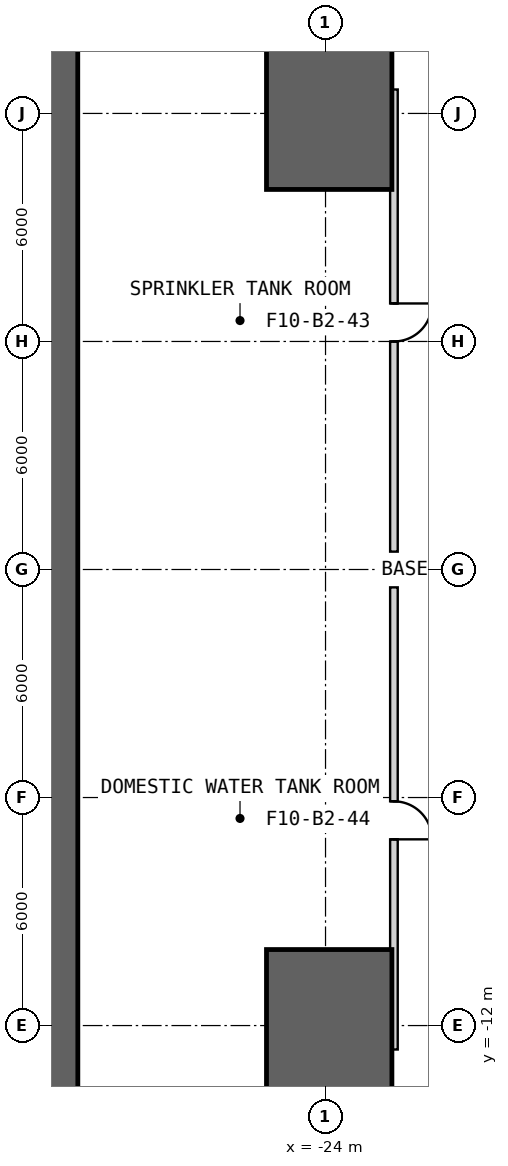
"""IFC4 building model, lengths in metres.
Left out: names, types, materials, properties, quantities, classifications, styles, units other than length and angle.
Written with IfcOpenShell. Run it as: python <this file> out.ifc"""

import sys

from ifc_helpers import new_model, si_unit, direction, frame, frame_2d, origin, place, context, subcontext, project, spatial, polyline, rectangle, outline, extrude, element, fill, save


model = new_model("IFC4")
c1 = context("Model", 3, precision=1e-05, world=origin(), true_north=direction((0.0, 1.0)))
c2 = subcontext(c1, "Body", "Model", "MODEL_VIEW")
j1 = project(units=[si_unit("LENGTHUNIT", "METRE"), si_unit("PLANEANGLEUNIT", "RADIAN")], contexts=[c1])
p1 = place(None, origin())
s1 = spatial("IfcSite", under=j1, at=p1, CompositionType="ELEMENT")
p2 = place(p1, origin())
s2 = spatial("IfcBuilding", under=s1, at=p2, CompositionType="ELEMENT")
p3 = place(p2, frame((0.0, 0.0, -11.0)))
s3 = spatial("IfcBuildingStorey", under=s2, at=p3, CompositionType="ELEMENT", Elevation=-11.0)
p4 = place(p3, frame((-31.117, -20.99, -0.4), z_axis=(0.0, 0.0, 1.0), x_axis=(-6.9786511e-05, 0.999999997565, 0.0)))
e1 = element("IfcWall", 1, at=p4, inside=s3, PredefinedType="SHEAR", context=c2, shape_type="SweptSolid", body=[
    extrude(rectangle(XDim=41.981, YDim=1.2, at=frame_2d((20.99, 0.0))), origin(), (0.0, 0.0, 1.0), 5.9),
])
p5 = place(p3, frame((0.0, 0.0, -0.4)))
e2 = element("IfcWall", 2, at=p5, inside=s3, PredefinedType="SHEAR", context=c2, shape_type="SweptSolid", body=[
    extrude(outline(polyline([(-25.553, 14.0), (-25.553, 10.0), (-22.253, 10.0), (-22.253, 14.0), (-25.553, 14.0)])), origin(), (0.0, 0.0, 1.0), 5.9),
])
p6 = place(p3, frame((0.0, 0.0, -0.4)))
e3 = element("IfcWall", 3, at=p6, inside=s3, PredefinedType="SHEAR", context=c2, shape_type="SweptSolid", body=[
    extrude(outline(polyline([(-25.553, -10.0), (-25.553, -14.0), (-22.253, -14.0), (-22.253, -10.0), (-25.553, -10.0)])), origin(), (0.0, 0.0, 1.0), 5.9),
])
p7 = place(p3, frame((-22.2, 12.63, 0.0), z_axis=(0.0, 0.0, 1.0), x_axis=(0.0, -1.0, 0.0)))
e4 = element("IfcWall", 4, at=p7, inside=s3, PredefinedType="PARTITIONING", context=c2, shape_type="SweptSolid", body=[
    extrude(rectangle(XDim=12.16, YDim=0.2, at=frame_2d((6.08, 0.0))), origin(), (0.0, 0.0, 1.0), 5.1),
])
p8 = place(p7, frame((5.63, 0.0, 0.0)))
e5 = element("IfcOpeningElement", 5, at=p8, cuts=e4, PredefinedType="OPENING", context=c2, shape_type="SweptSolid", body=[
    extrude(rectangle(XDim=1.0, YDim=2.1, at=frame_2d((0.5, 1.05))), frame((0.0, 0.11, 0.0), z_axis=(0.0, -1.0, 0.0), x_axis=(1.0, 0.0, 0.0)), (0.0, 0.0, 1.0), 0.22),
])
p9 = place(p3, frame((-22.2, -0.47, 0.0), z_axis=(0.0, 0.0, 1.0), x_axis=(0.0, -1.0, 0.0)))
e6 = element("IfcWall", 6, at=p9, inside=s3, PredefinedType="PARTITIONING", context=c2, shape_type="SweptSolid", body=[
    extrude(rectangle(XDim=12.16, YDim=0.2, at=frame_2d((6.08, 0.0))), origin(), (0.0, 0.0, 1.0), 5.1),
])
p10 = place(p9, frame((5.63, 0.0, 0.0)))
e7 = element("IfcOpeningElement", 7, at=p10, cuts=e6, PredefinedType="OPENING", context=c2, shape_type="SweptSolid", body=[
    extrude(rectangle(XDim=1.0, YDim=2.1, at=frame_2d((0.5, 1.05))), frame((0.0, 0.11, 0.0), z_axis=(0.0, -1.0, 0.0), x_axis=(1.0, 0.0, 0.0)), (0.0, 0.0, 1.0), 0.22),
])
p11 = place(p8, origin())
e8 = element("IfcDoor", 8, at=p11, inside=s3, OperationType="SINGLE_SWING_LEFT", PredefinedType="USERDEFINED", context=c2, shape_type="SweptSolid", body=[
    extrude(rectangle(XDim=1.0, YDim=2.1, at=frame_2d((0.5, 1.05))), frame((0.0, 0.025, 0.0), z_axis=(0.0, -1.0, 0.0), x_axis=(1.0, 0.0, 0.0)), (0.0, 0.0, 1.0), 0.05),
])
fill(e5, e8)
p12 = place(p10, origin())
e9 = element("IfcDoor", 9, at=p12, inside=s3, OperationType="SINGLE_SWING_RIGHT", PredefinedType="USERDEFINED", context=c2, shape_type="SweptSolid", body=[
    extrude(rectangle(XDim=1.0, YDim=2.1, at=frame_2d((0.5, 1.05))), frame((0.0, 0.025, 0.0), z_axis=(0.0, -1.0, 0.0), x_axis=(1.0, 0.0, 0.0)), (0.0, 0.0, 1.0), 0.05),
])
fill(e7, e9)
save(model, sys.argv[1])
